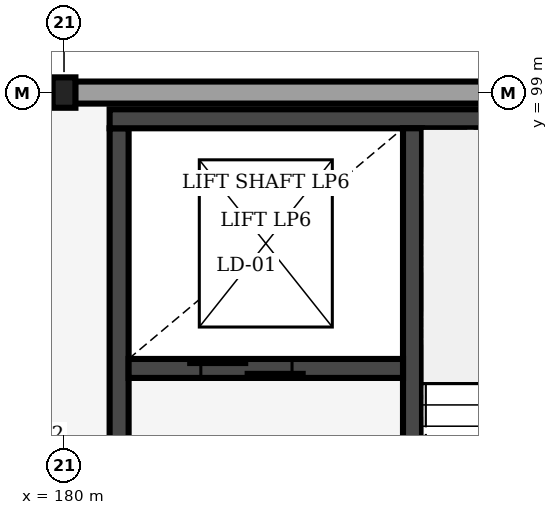
"""IFC4 building model, lengths in metres.
Left out: names, types, materials, properties, quantities, classifications, styles, units other than length and angle.
Written with IfcOpenShell. Run it as: python <this file> out.ifc"""

import sys

from ifc_helpers import new_model, si_unit, direction, frame, frame_2d, origin, origin_2d, place, context, subcontext, project, spatial, rectangle, i_section, extrude, element, fill, save


model = new_model("IFC4")
c1 = context("Model", 3, precision=1e-05, world=origin(), true_north=direction((0.0, 1.0)))
c2 = subcontext(c1, "Body", "Model", "MODEL_VIEW")
j1 = project(units=[si_unit("LENGTHUNIT", "METRE"), si_unit("PLANEANGLEUNIT", "RADIAN")], contexts=[c1])
p1 = place(None, origin())
s1 = spatial("IfcSite", under=j1, at=p1, CompositionType="ELEMENT")
p2 = place(p1, origin())
s2 = spatial("IfcBuilding", under=s1, at=p2, CompositionType="ELEMENT")
p3 = place(p2, frame((0.0, 0.0, 22.8)))
s3 = spatial("IfcBuildingStorey", under=s2, at=p3, CompositionType="ELEMENT", Elevation=22.8)
p4 = place(p3, frame((180.0, 99.0, 0.0), z_axis=(0.0, 0.0, 1.0), x_axis=(1.0, 0.0, 0.0)))
e1 = element("IfcColumn", 1, at=p4, inside=s3, PredefinedType="COLUMN", context=c2, shape_type="SweptSolid", body=[
    extrude(i_section(OverallWidth=0.3, OverallDepth=0.4, WebThickness=0.013, FlangeThickness=0.024, FilletRadius=0.027, at=origin_2d()), origin(), (0.0, 0.0, 1.0), 4.0),
])
p5 = place(p3, frame((180.145, 99.0, 0.0), z_axis=(0.0, 0.0, 1.0), x_axis=(1.0, 0.0, 0.0)))
e2 = element("IfcWall", 2, at=p5, inside=s3, PredefinedType="SOLIDWALL", context=c2, shape_type="SweptSolid", body=[
    extrude(rectangle(XDim=11.71, YDim=0.29, at=frame_2d((5.855, 0.0))), origin(), (0.0, 0.0, 1.0), 2.85),
])
p6 = place(p3, frame((180.725, 90.47, 0.0), z_axis=(0.0, 0.0, 1.0), x_axis=(0.0, 1.0, 0.0)))
e3 = element("IfcWall", 3, at=p6, inside=s3, PredefinedType="SHEAR", context=c2, shape_type="SweptSolid", body=[
    extrude(rectangle(XDim=8.06, YDim=0.25, at=frame_2d((4.03, 0.0))), origin(), (0.0, 0.0, 1.0), 3.64),
])
p7 = place(p6, frame((1.15, 0.0, 0.0)))
e4 = element("IfcOpeningElement", 4, at=p7, cuts=e3, PredefinedType="OPENING", context=c2, shape_type="SweptSolid", body=[
    extrude(rectangle(XDim=1.6, YDim=2.2, at=frame_2d((0.8, 1.1))), frame((0.0, 0.135, 0.0), z_axis=(0.0, -1.0, 0.0), x_axis=(1.0, 0.0, 0.0)), (0.0, 0.0, 1.0), 0.27),
])
p8 = place(p3, frame((180.6, 98.655, 0.0), z_axis=(0.0, 0.0, 1.0), x_axis=(1.0, 0.0, 0.0)))
e5 = element("IfcWall", 5, at=p8, inside=s3, PredefinedType="SHEAR", context=c2, shape_type="SweptSolid", body=[
    extrude(rectangle(XDim=7.8, YDim=0.25, at=frame_2d((3.9, 0.0))), origin(), (0.0, 0.0, 1.0), 3.64),
])
p9 = place(p3, frame((184.585, 90.47, 0.0), z_axis=(0.0, 0.0, 1.0), x_axis=(0.0, 1.0, 0.0)))
e6 = element("IfcWall", 6, at=p9, inside=s3, PredefinedType="SHEAR", context=c2, shape_type="SweptSolid", body=[
    extrude(rectangle(XDim=8.06, YDim=0.25, at=frame_2d((4.03, 0.0))), origin(), (0.0, 0.0, 1.0), 3.64),
])
p10 = place(p9, frame((0.25, 0.0, 0.0)))
e7 = element("IfcOpeningElement", 7, at=p10, cuts=e6, PredefinedType="OPENING", context=c2, shape_type="SweptSolid", body=[
    extrude(rectangle(XDim=1.15, YDim=2.15, at=frame_2d((0.575, 1.075))), frame((0.0, 0.135, 0.0), z_axis=(0.0, -1.0, 0.0), x_axis=(1.0, 0.0, 0.0)), (0.0, 0.0, 1.0), 0.27),
])
p11 = place(p3, frame((180.85, 95.37, 0.0), z_axis=(0.0, 0.0, 1.0), x_axis=(1.0, 0.0, 0.0)))
e8 = element("IfcWall", 8, at=p11, inside=s3, PredefinedType="SHEAR", context=c2, shape_type="SweptSolid", body=[
    extrude(rectangle(XDim=3.61, YDim=0.25, at=frame_2d((1.805, 0.0))), origin(), (0.0, 0.0, 1.0), 3.64),
])
p12 = place(p11, frame((0.95, 0.0, 0.0)))
e9 = element("IfcOpeningElement", 9, at=p12, cuts=e8, PredefinedType="OPENING", context=c2, shape_type="SweptSolid", body=[
    extrude(rectangle(XDim=1.2, YDim=2.2, at=frame_2d((0.6, 1.1))), frame((0.0, 0.135, 0.0), z_axis=(0.0, -1.0, 0.0), x_axis=(1.0, 0.0, 0.0)), (0.0, 0.0, 1.0), 0.27),
])
p13 = place(p12, origin())
e10 = element("IfcDoor", 10, at=p13, inside=s3, OperationType="DOUBLE_DOOR_SLIDING", PredefinedType="DOOR", context=c2, shape_type="SweptSolid", body=[
    extrude(rectangle(XDim=1.2, YDim=2.2, at=frame_2d((0.6, 1.1))), frame((0.0, 0.025, 0.0), z_axis=(0.0, -1.0, 0.0), x_axis=(1.0, 0.0, 0.0)), (0.0, 0.0, 1.0), 0.05),
])
fill(e9, e10)
save(model, sys.argv[1])
